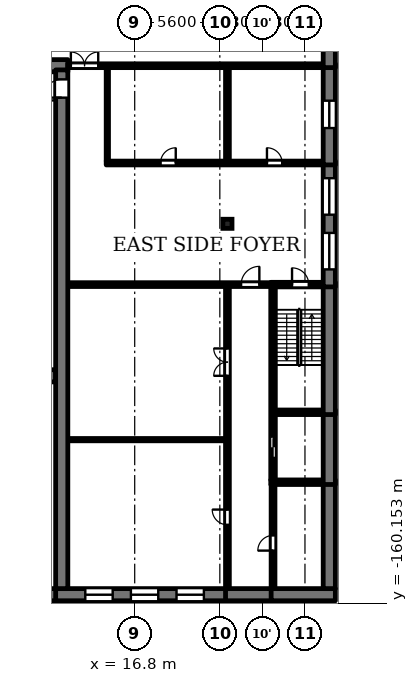
"""IFC4 building model, lengths in metres.
Left out: names, types, materials, properties, quantities, classifications, styles, units other than length and angle.
Written with IfcOpenShell. Run it as: python <this file> out.ifc"""

import sys

from ifc_helpers import new_model, si_unit, direction, frame, frame_2d, origin, origin_2d, place, context, subcontext, project, spatial, rectangle, extrude, element, fill, save


model = new_model("IFC4")
c1 = context("Model", 3, precision=1e-05, world=origin(), true_north=direction((0.0, 1.0)))
c2 = subcontext(c1, "Body", "Model", "MODEL_VIEW")
j1 = project(units=[si_unit("LENGTHUNIT", "METRE"), si_unit("PLANEANGLEUNIT", "RADIAN")], contexts=[c1])
p1 = place(None, origin())
s1 = spatial("IfcSite", under=j1, at=p1, CompositionType="ELEMENT")
p2 = place(p1, origin())
s2 = spatial("IfcBuilding", under=s1, at=p2, CompositionType="ELEMENT")
p3 = place(p2, frame((0.0, 0.0, 6.5)))
s3 = spatial("IfcBuildingStorey", under=s2, at=p3, CompositionType="ELEMENT", Elevation=6.5)
p4 = place(p3, frame((22.9, -135.2, 0.0), z_axis=(0.0, 0.0, 1.0), x_axis=(1.0, 0.0, 0.0)))
e1 = element("IfcColumn", 1, at=p4, inside=s3, PredefinedType="COLUMN", context=c2, shape_type="SweptSolid", body=[
    extrude(rectangle(XDim=0.6, YDim=0.6, at=origin_2d()), origin(), (0.0, 0.0, 1.0), 4.45),
])
p5 = place(p3, frame((-12.4, -159.6, 0.0), z_axis=(0.0, 0.0, 1.0), x_axis=(1.0, 0.0, 0.0)))
e2 = element("IfcWall", 2, at=p5, inside=s3, PredefinedType="SOLIDWALL", context=c2, shape_type="SweptSolid", body=[
    extrude(rectangle(XDim=24.8, YDim=0.8, at=frame_2d((12.4, 0.0))), origin(), (0.0, 0.0, 1.0), 4.8),
])
p6 = place(p3, frame((11.6, -159.6, 0.0), z_axis=(0.0, 0.0, 1.0), x_axis=(1.0, 0.0, 0.0)))
e3 = element("IfcWall", 3, at=p6, inside=s3, PredefinedType="SOLIDWALL", context=c2, shape_type="SweptSolid", body=[
    extrude(rectangle(XDim=11.425, YDim=0.8, at=frame_2d((5.712, 0.0))), origin(), (0.0, 0.0, 1.0), 4.45),
])
p7 = place(p6, frame((1.95, 0.0, 0.9)))
e4 = element("IfcOpeningElement", 4, at=p7, cuts=e3, PredefinedType="OPENING", context=c2, shape_type="SweptSolid", body=[
    extrude(rectangle(XDim=1.8, YDim=1.5, at=frame_2d((0.9, 0.75))), frame((0.0, 0.41, 0.0), z_axis=(0.0, -1.0, 0.0), x_axis=(1.0, 0.0, 0.0)), (0.0, 0.0, 1.0), 0.82),
])
p8 = place(p6, frame((4.95, 0.0, 0.9)))
e5 = element("IfcOpeningElement", 5, at=p8, cuts=e3, PredefinedType="OPENING", context=c2, shape_type="SweptSolid", body=[
    extrude(rectangle(XDim=1.8, YDim=1.5, at=frame_2d((0.9, 0.75))), frame((0.0, 0.41, 0.0), z_axis=(0.0, -1.0, 0.0), x_axis=(1.0, 0.0, 0.0)), (0.0, 0.0, 1.0), 0.82),
])
p9 = place(p6, frame((7.95, 0.0, 0.9)))
e6 = element("IfcOpeningElement", 6, at=p9, cuts=e3, PredefinedType="OPENING", context=c2, shape_type="SweptSolid", body=[
    extrude(rectangle(XDim=1.8, YDim=1.5, at=frame_2d((0.9, 0.75))), frame((0.0, 0.41, 0.0), z_axis=(0.0, -1.0, 0.0), x_axis=(1.0, 0.0, 0.0)), (0.0, 0.0, 1.0), 0.82),
])
p10 = place(p3, frame((22.775, -159.6, 0.0), z_axis=(0.0, 0.0, 1.0), x_axis=(1.0, 0.0, 0.0)))
e7 = element("IfcWall", 7, at=p10, inside=s3, PredefinedType="SOLIDWALL", context=c2, shape_type="SweptSolid", body=[
    extrude(rectangle(XDim=3.25, YDim=0.8, at=frame_2d((1.625, 0.0))), origin(), (0.0, 0.0, 1.0), 4.45),
])
p11 = place(p3, frame((25.775, -159.6, 0.0), z_axis=(0.0, 0.0, 1.0), x_axis=(1.0, 0.0, 0.0)))
e8 = element("IfcWall", 8, at=p11, inside=s3, PredefinedType="SOLIDWALL", context=c2, shape_type="SweptSolid", body=[
    extrude(rectangle(XDim=4.225, YDim=0.8, at=frame_2d((2.112, 0.0))), origin(), (0.0, 0.0, 1.0), 4.45),
])
p12 = place(p3, frame((25.75, -152.2, 0.0), z_axis=(0.0, 0.0, 1.0), x_axis=(1.0, 0.0, 0.0)))
e9 = element("IfcWall", 9, at=p12, inside=s3, PredefinedType="SOLIDWALL", context=c2, shape_type="SweptSolid", body=[
    extrude(rectangle(XDim=3.45, YDim=0.3, at=frame_2d((1.725, 0.0))), origin(), (0.0, 0.0, 1.0), 4.45),
])
p13 = place(p3, frame((12.4, -149.4, 0.0), z_axis=(0.0, 0.0, 1.0), x_axis=(1.0, 0.0, 0.0)))
e10 = element("IfcWall", 10, at=p13, inside=s3, PredefinedType="PARTITIONING", context=c2, shape_type="SweptSolid", body=[
    extrude(rectangle(XDim=10.375, YDim=0.15, at=frame_2d((5.188, 0.0))), origin(), (0.0, 0.0, 1.0), 4.45),
])
p14 = place(p3, frame((26.05, -147.6, 0.0), z_axis=(0.0, 0.0, 1.0), x_axis=(1.0, 0.0, 0.0)))
e11 = element("IfcWall", 11, at=p14, inside=s3, PredefinedType="SOLIDWALL", context=c2, shape_type="SweptSolid", body=[
    extrude(rectangle(XDim=3.15, YDim=0.3, at=frame_2d((1.575, 0.0))), origin(), (0.0, 0.0, 1.0), 4.45),
])
p15 = place(p3, frame((7.0, -145.2, 0.0), z_axis=(0.0, 0.0, 1.0), x_axis=(1.0, 0.0, 0.0)))
e12 = element("IfcWall", 12, at=p15, inside=s3, PredefinedType="SOLIDWALL", context=c2, shape_type="SweptSolid", body=[
    extrude(rectangle(XDim=4.6, YDim=0.8, at=frame_2d((2.3, 0.0))), origin(), (0.0, 0.0, 1.0), 4.8),
])
p16 = place(p3, frame((12.4, -139.2, 0.0), z_axis=(0.0, 0.0, 1.0), x_axis=(1.0, 0.0, 0.0)))
e13 = element("IfcWall", 13, at=p16, inside=s3, PredefinedType="SOLIDWALL", context=c2, shape_type="SweptSolid", body=[
    extrude(rectangle(XDim=13.35, YDim=0.25, at=frame_2d((6.675, 0.0))), origin(), (0.0, 0.0, 1.0), 4.45),
])
p17 = place(p16, frame((11.4, 0.0, 0.0)))
e14 = element("IfcOpeningElement", 14, at=p17, cuts=e13, PredefinedType="OPENING", context=c2, shape_type="SweptSolid", body=[
    extrude(rectangle(XDim=1.2, YDim=2.1, at=frame_2d((0.6, 1.05))), frame((0.0, 0.135, 0.0), z_axis=(0.0, -1.0, 0.0), x_axis=(1.0, 0.0, 0.0)), (0.0, 0.0, 1.0), 0.27),
])
p18 = place(p3, frame((25.75, -139.2, 0.0), z_axis=(0.0, 0.0, 1.0), x_axis=(1.0, 0.0, 0.0)))
e15 = element("IfcWall", 15, at=p18, inside=s3, PredefinedType="SOLIDWALL", context=c2, shape_type="SweptSolid", body=[
    extrude(rectangle(XDim=3.45, YDim=0.3, at=frame_2d((1.725, 0.0))), origin(), (0.0, 0.0, 1.0), 4.45),
])
p19 = place(p18, frame((1.4, 0.0, 0.0)))
e16 = element("IfcOpeningElement", 16, at=p19, cuts=e15, PredefinedType="OPENING", context=c2, shape_type="SweptSolid", body=[
    extrude(rectangle(XDim=1.1, YDim=2.1, at=frame_2d((0.55, 1.05))), frame((0.0, 0.16, 0.0), z_axis=(0.0, -1.0, 0.0), x_axis=(1.0, 0.0, 0.0)), (0.0, 0.0, 1.0), 0.32),
])
p20 = place(p3, frame((14.925, -131.2, 0.0), z_axis=(0.0, 0.0, 1.0), x_axis=(1.0, 0.0, 0.0)))
e17 = element("IfcWall", 17, at=p20, inside=s3, PredefinedType="SOLIDWALL", context=c2, shape_type="SweptSolid", body=[
    extrude(rectangle(XDim=14.275, YDim=0.25, at=frame_2d((7.137, 0.0))), origin(), (0.0, 0.0, 1.0), 4.45),
])
p21 = place(p20, frame((3.575, 0.0, 0.0)))
e18 = element("IfcOpeningElement", 18, at=p21, cuts=e17, PredefinedType="OPENING", context=c2, shape_type="SweptSolid", body=[
    extrude(rectangle(XDim=1.0, YDim=2.1, at=frame_2d((0.5, 1.05))), frame((0.0, 0.135, 0.0), z_axis=(0.0, -1.0, 0.0), x_axis=(1.0, 0.0, 0.0)), (0.0, 0.0, 1.0), 0.27),
])
p22 = place(p20, frame((10.575, 0.0, 0.0)))
e19 = element("IfcOpeningElement", 19, at=p22, cuts=e17, PredefinedType="OPENING", context=c2, shape_type="SweptSolid", body=[
    extrude(rectangle(XDim=1.0, YDim=2.1, at=frame_2d((0.5, 1.05))), frame((0.0, 0.135, 0.0), z_axis=(0.0, -1.0, 0.0), x_axis=(1.0, 0.0, 0.0)), (0.0, 0.0, 1.0), 0.27),
])
p23 = place(p3, frame((-12.4, -124.8, 0.0), z_axis=(0.0, 0.0, 1.0), x_axis=(1.0, 0.0, 0.0)))
e20 = element("IfcWall", 20, at=p23, inside=s3, PredefinedType="SOLIDWALL", context=c2, shape_type="SweptSolid", body=[
    extrude(rectangle(XDim=24.8, YDim=0.8, at=frame_2d((12.4, 0.0))), origin(), (0.0, 0.0, 1.0), 4.8),
])
p24 = place(p23, frame((5.5, 0.0, 0.0)))
e21 = element("IfcOpeningElement", 21, at=p24, cuts=e20, PredefinedType="OPENING", context=c2, shape_type="SweptSolid", body=[
    extrude(rectangle(XDim=1.8, YDim=2.2, at=frame_2d((0.9, 1.1))), frame((0.0, 0.41, 0.0), z_axis=(0.0, -1.0, 0.0), x_axis=(1.0, 0.0, 0.0)), (0.0, 0.0, 1.0), 0.82),
])
p25 = place(p23, frame((17.5, 0.0, 0.0)))
e22 = element("IfcOpeningElement", 22, at=p25, cuts=e20, PredefinedType="OPENING", context=c2, shape_type="SweptSolid", body=[
    extrude(rectangle(XDim=1.8, YDim=2.2, at=frame_2d((0.9, 1.1))), frame((0.0, 0.41, 0.0), z_axis=(0.0, -1.0, 0.0), x_axis=(1.0, 0.0, 0.0)), (0.0, 0.0, 1.0), 0.82),
])
p26 = place(p3, frame((12.4, -124.8, 0.0), z_axis=(0.0, 0.0, 1.0), x_axis=(1.0, 0.0, 0.0)))
e23 = element("IfcWall", 23, at=p26, inside=s3, PredefinedType="SOLIDWALL", context=c2, shape_type="SweptSolid", body=[
    extrude(rectangle(XDim=16.8, YDim=0.25, at=frame_2d((8.4, 0.0))), origin(), (0.0, 0.0, 1.0), 4.45),
])
p27 = place(p26, frame((0.2, 0.0, 0.0)))
e24 = element("IfcOpeningElement", 24, at=p27, cuts=e23, PredefinedType="OPENING", context=c2, shape_type="SweptSolid", body=[
    extrude(rectangle(XDim=1.8, YDim=2.1, at=frame_2d((0.9, 1.05))), frame((0.0, 0.135, 0.0), z_axis=(0.0, -1.0, 0.0), x_axis=(1.0, 0.0, 0.0)), (0.0, 0.0, 1.0), 0.27),
])
p28 = place(p3, frame((12.0, -159.2, 0.0), z_axis=(0.0, 0.0, 1.0), x_axis=(0.0, 1.0, 0.0)))
e25 = element("IfcWall", 25, at=p28, inside=s3, PredefinedType="SOLIDWALL", context=c2, shape_type="SweptSolid", body=[
    extrude(rectangle(XDim=34.125, YDim=0.8, at=frame_2d((17.062, 0.0))), origin(), (0.0, 0.0, 1.0), 4.8),
])
p29 = place(p28, frame((32.3, 0.0, 0.0)))
e26 = element("IfcOpeningElement", 26, at=p29, cuts=e25, PredefinedType="OPENING", context=c2, shape_type="SweptSolid", body=[
    extrude(rectangle(XDim=1.2, YDim=2.1, at=frame_2d((0.6, 1.05))), frame((0.0, 0.41, 0.0), z_axis=(0.0, -1.0, 0.0), x_axis=(1.0, 0.0, 0.0)), (0.0, 0.0, 1.0), 0.82),
])
p30 = place(p3, frame((15.0, -131.075, 0.0), z_axis=(0.0, 0.0, 1.0), x_axis=(0.0, 1.0, 0.0)))
e27 = element("IfcWall", 27, at=p30, inside=s3, PredefinedType="PARTITIONING", context=c2, shape_type="SweptSolid", body=[
    extrude(rectangle(XDim=6.15, YDim=0.15, at=frame_2d((3.075, 0.0))), origin(), (0.0, 0.0, 1.0), 4.45),
])
p31 = place(p3, frame((22.9, -159.2, 0.0), z_axis=(0.0, 0.0, 1.0), x_axis=(0.0, 1.0, 0.0)))
e28 = element("IfcWall", 28, at=p31, inside=s3, PredefinedType="SOLIDWALL", context=c2, shape_type="SweptSolid", body=[
    extrude(rectangle(XDim=19.875, YDim=0.25, at=frame_2d((9.938, 0.0))), origin(), (0.0, 0.0, 1.0), 4.45),
])
p32 = place(p31, frame((14.0, 0.0, 0.0)))
e29 = element("IfcOpeningElement", 29, at=p32, cuts=e28, PredefinedType="OPENING", context=c2, shape_type="SweptSolid", body=[
    extrude(rectangle(XDim=1.8, YDim=2.1, at=frame_2d((0.9, 1.05))), frame((0.0, 0.135, 0.0), z_axis=(0.0, -1.0, 0.0), x_axis=(1.0, 0.0, 0.0)), (0.0, 0.0, 1.0), 0.27),
])
p33 = place(p31, frame((4.2, 0.0, 0.0)))
e30 = element("IfcOpeningElement", 30, at=p33, cuts=e28, PredefinedType="OPENING", context=c2, shape_type="SweptSolid", body=[
    extrude(rectangle(XDim=1.0, YDim=2.1, at=frame_2d((0.5, 1.05))), frame((0.0, 0.135, 0.0), z_axis=(0.0, -1.0, 0.0), x_axis=(1.0, 0.0, 0.0)), (0.0, 0.0, 1.0), 0.27),
])
p34 = place(p3, frame((22.9, -131.075, 0.0), z_axis=(0.0, 0.0, 1.0), x_axis=(0.0, 1.0, 0.0)))
e31 = element("IfcWall", 31, at=p34, inside=s3, PredefinedType="SOLIDWALL", context=c2, shape_type="SweptSolid", body=[
    extrude(rectangle(XDim=6.15, YDim=0.25, at=frame_2d((3.075, 0.0))), origin(), (0.0, 0.0, 1.0), 4.45),
])
p35 = place(p3, frame((25.9, -159.2, 0.0), z_axis=(0.0, 0.0, 1.0), x_axis=(0.0, 1.0, 0.0)))
e32 = element("IfcWall", 32, at=p35, inside=s3, PredefinedType="SOLIDWALL", context=c2, shape_type="SweptSolid", body=[
    extrude(rectangle(XDim=6.85, YDim=0.25, at=frame_2d((3.425, 0.0))), origin(), (0.0, 0.0, 1.0), 4.45),
])
p36 = place(p35, frame((2.5, 0.0, 0.0)))
e33 = element("IfcOpeningElement", 33, at=p36, cuts=e32, PredefinedType="OPENING", context=c2, shape_type="SweptSolid", body=[
    extrude(rectangle(XDim=1.0, YDim=2.1, at=frame_2d((0.5, 1.05))), frame((0.0, 0.135, 0.0), z_axis=(0.0, -1.0, 0.0), x_axis=(1.0, 0.0, 0.0)), (0.0, 0.0, 1.0), 0.27),
])
p37 = place(p3, frame((25.9, -152.05, 0.0), z_axis=(0.0, 0.0, 1.0), x_axis=(0.0, 1.0, 0.0)))
e34 = element("IfcWall", 34, at=p37, inside=s3, PredefinedType="SOLIDWALL", context=c2, shape_type="SweptSolid", body=[
    extrude(rectangle(XDim=12.825, YDim=0.3, at=frame_2d((6.413, 0.0))), origin(), (0.0, 0.0, 1.0), 4.45),
])
p38 = place(p37, frame((1.45, 0.0, 0.0)))
e35 = element("IfcOpeningElement", 35, at=p38, cuts=e34, PredefinedType="OPENING", context=c2, shape_type="SweptSolid", body=[
    extrude(rectangle(XDim=1.4, YDim=2.2, at=frame_2d((0.7, 1.1))), frame((0.0, 0.16, 0.0), z_axis=(0.0, -1.0, 0.0), x_axis=(1.0, 0.0, 0.0)), (0.0, 0.0, 1.0), 0.32),
])
p39 = place(p3, frame((29.6, -152.05, 0.0), z_axis=(0.0, 0.0, 1.0), x_axis=(0.0, -1.0, 0.0)))
e36 = element("IfcWall", 36, at=p39, inside=s3, PredefinedType="SOLIDWALL", context=c2, shape_type="SweptSolid", body=[
    extrude(rectangle(XDim=7.15, YDim=0.8, at=frame_2d((3.575, 0.0))), origin(), (0.0, 0.0, 1.0), 4.45),
])
p40 = place(p3, frame((29.6, -147.45, 0.0), z_axis=(0.0, 0.0, 1.0), x_axis=(0.0, -1.0, 0.0)))
e37 = element("IfcWall", 37, at=p40, inside=s3, PredefinedType="SOLIDWALL", context=c2, shape_type="SweptSolid", body=[
    extrude(rectangle(XDim=4.9, YDim=0.8, at=frame_2d((2.45, 0.0))), origin(), (0.0, 0.0, 1.0), 4.45),
])
p41 = place(p3, frame((29.6, -139.05, 0.0), z_axis=(0.0, 0.0, 1.0), x_axis=(0.0, -1.0, 0.0)))
e38 = element("IfcWall", 38, at=p41, inside=s3, PredefinedType="SOLIDWALL", context=c2, shape_type="SweptSolid", body=[
    extrude(rectangle(XDim=8.7, YDim=0.8, at=frame_2d((4.35, 0.0))), origin(), (0.0, 0.0, 1.0), 4.45),
])
p42 = place(p3, frame((29.6, -131.075, 0.0), z_axis=(0.0, 0.0, 1.0), x_axis=(0.0, -1.0, 0.0)))
e39 = element("IfcWall", 39, at=p42, inside=s3, PredefinedType="SOLIDWALL", context=c2, shape_type="SweptSolid", body=[
    extrude(rectangle(XDim=8.275, YDim=0.8, at=frame_2d((4.137, 0.0))), origin(), (0.0, 0.0, 1.0), 4.45),
])
p43 = place(p42, frame((4.725, 0.0, 0.6)))
e40 = element("IfcOpeningElement", 40, at=p43, cuts=e39, PredefinedType="OPENING", context=c2, shape_type="SweptSolid", body=[
    extrude(rectangle(XDim=2.4, YDim=3.2, at=frame_2d((1.2, 1.6))), frame((0.0, 0.41, 0.0), z_axis=(0.0, -1.0, 0.0), x_axis=(1.0, 0.0, 0.0)), (0.0, 0.0, 1.0), 0.82),
])
p44 = place(p42, frame((1.125, 0.0, 0.6)))
e41 = element("IfcOpeningElement", 41, at=p44, cuts=e39, PredefinedType="OPENING", context=c2, shape_type="SweptSolid", body=[
    extrude(rectangle(XDim=2.4, YDim=3.2, at=frame_2d((1.2, 1.6))), frame((0.0, 0.41, 0.0), z_axis=(0.0, -1.0, 0.0), x_axis=(1.0, 0.0, 0.0)), (0.0, 0.0, 1.0), 0.82),
])
p45 = place(p3, frame((29.6, -124.675, 0.0), z_axis=(0.0, 0.0, 1.0), x_axis=(0.0, -1.0, 0.0)))
e42 = element("IfcWall", 42, at=p45, inside=s3, PredefinedType="SOLIDWALL", context=c2, shape_type="SweptSolid", body=[
    extrude(rectangle(XDim=6.65, YDim=0.8, at=frame_2d((3.325, 0.0))), origin(), (0.0, 0.0, 1.0), 4.45),
])
p46 = place(p45, frame((2.425, 0.0, 0.9)))
e43 = element("IfcOpeningElement", 43, at=p46, cuts=e42, PredefinedType="OPENING", context=c2, shape_type="SweptSolid", body=[
    extrude(rectangle(XDim=1.8, YDim=1.5, at=frame_2d((0.9, 0.75))), frame((0.0, 0.41, 0.0), z_axis=(0.0, -1.0, 0.0), x_axis=(1.0, 0.0, 0.0)), (0.0, 0.0, 1.0), 0.82),
])
p47 = place(p3, frame((29.6, -121.05, 0.0), z_axis=(0.0, 0.0, 1.0), x_axis=(0.0, -1.0, 0.0)))
e44 = element("IfcWall", 44, at=p47, inside=s3, PredefinedType="SOLIDWALL", context=c2, shape_type="SweptSolid", body=[
    extrude(rectangle(XDim=3.875, YDim=0.8, at=frame_2d((1.938, 0.0))), origin(), (0.0, 0.0, 1.0), 4.45),
])
p48 = place(p43, origin())
e45 = element("IfcWindow", 45, at=p48, inside=s3, PartitioningType="SINGLE_PANEL", PredefinedType="WINDOW", context=c2, shape_type="SweptSolid", body=[
    extrude(rectangle(XDim=2.4, YDim=3.2, at=frame_2d((1.2, 1.6))), frame((0.0, 0.03, 0.0), z_axis=(0.0, -1.0, 0.0), x_axis=(1.0, 0.0, 0.0)), (0.0, 0.0, 1.0), 0.06),
])
fill(e40, e45)
p49 = place(p44, origin())
e46 = element("IfcWindow", 46, at=p49, inside=s3, PartitioningType="SINGLE_PANEL", PredefinedType="WINDOW", context=c2, shape_type="SweptSolid", body=[
    extrude(rectangle(XDim=2.4, YDim=3.2, at=frame_2d((1.2, 1.6))), frame((0.0, 0.03, 0.0), z_axis=(0.0, -1.0, 0.0), x_axis=(1.0, 0.0, 0.0)), (0.0, 0.0, 1.0), 0.06),
])
fill(e41, e46)
p50 = place(p46, origin())
e47 = element("IfcWindow", 47, at=p50, inside=s3, PartitioningType="SINGLE_PANEL", PredefinedType="WINDOW", context=c2, shape_type="SweptSolid", body=[
    extrude(rectangle(XDim=1.8, YDim=1.5, at=frame_2d((0.9, 0.75))), frame((0.0, 0.03, 0.0), z_axis=(0.0, -1.0, 0.0), x_axis=(1.0, 0.0, 0.0)), (0.0, 0.0, 1.0), 0.06),
])
fill(e43, e47)
p51 = place(p7, origin())
e48 = element("IfcWindow", 48, at=p51, inside=s3, PartitioningType="SINGLE_PANEL", PredefinedType="WINDOW", context=c2, shape_type="SweptSolid", body=[
    extrude(rectangle(XDim=1.8, YDim=1.5, at=frame_2d((0.9, 0.75))), frame((0.0, 0.03, 0.0), z_axis=(0.0, -1.0, 0.0), x_axis=(1.0, 0.0, 0.0)), (0.0, 0.0, 1.0), 0.06),
])
fill(e4, e48)
p52 = place(p8, origin())
e49 = element("IfcWindow", 49, at=p52, inside=s3, PartitioningType="SINGLE_PANEL", PredefinedType="WINDOW", context=c2, shape_type="SweptSolid", body=[
    extrude(rectangle(XDim=1.8, YDim=1.5, at=frame_2d((0.9, 0.75))), frame((0.0, 0.03, 0.0), z_axis=(0.0, -1.0, 0.0), x_axis=(1.0, 0.0, 0.0)), (0.0, 0.0, 1.0), 0.06),
])
fill(e5, e49)
p53 = place(p9, origin())
e50 = element("IfcWindow", 50, at=p53, inside=s3, PartitioningType="SINGLE_PANEL", PredefinedType="WINDOW", context=c2, shape_type="SweptSolid", body=[
    extrude(rectangle(XDim=1.8, YDim=1.5, at=frame_2d((0.9, 0.75))), frame((0.0, 0.03, 0.0), z_axis=(0.0, -1.0, 0.0), x_axis=(1.0, 0.0, 0.0)), (0.0, 0.0, 1.0), 0.06),
])
fill(e6, e50)
p54 = place(p38, origin())
e51 = element("IfcDoor", 51, at=p54, inside=s3, OperationType="DOUBLE_DOOR_SLIDING", PredefinedType="DOOR", context=c2, shape_type="SweptSolid", body=[
    extrude(rectangle(XDim=1.4, YDim=2.2, at=frame_2d((0.7, 1.1))), frame((0.0, 0.025, 0.0), z_axis=(0.0, -1.0, 0.0), x_axis=(1.0, 0.0, 0.0)), (0.0, 0.0, 1.0), 0.05),
])
fill(e35, e51)
p55 = place(p19, origin())
e52 = element("IfcDoor", 52, at=p55, inside=s3, OperationType="SINGLE_SWING_LEFT", PredefinedType="DOOR", context=c2, shape_type="SweptSolid", body=[
    extrude(rectangle(XDim=1.1, YDim=2.1, at=frame_2d((0.55, 1.05))), frame((0.0, 0.025, 0.0), z_axis=(0.0, -1.0, 0.0), x_axis=(1.0, 0.0, 0.0)), (0.0, 0.0, 1.0), 0.05),
])
fill(e16, e52)
p56 = place(p29, origin())
e53 = element("IfcDoor", 53, at=p56, inside=s3, OperationType="SINGLE_SWING_LEFT", PredefinedType="DOOR", context=c2, shape_type="SweptSolid", body=[
    extrude(rectangle(XDim=1.2, YDim=2.1, at=frame_2d((0.6, 1.05))), frame((0.0, 0.025, 0.0), z_axis=(0.0, -1.0, 0.0), x_axis=(1.0, 0.0, 0.0)), (0.0, 0.0, 1.0), 0.05),
])
fill(e26, e53)
p57 = place(p27, origin())
e54 = element("IfcDoor", 54, at=p57, inside=s3, OperationType="DOUBLE_DOOR_SINGLE_SWING", PredefinedType="DOOR", context=c2, shape_type="SweptSolid", body=[
    extrude(rectangle(XDim=1.8, YDim=2.1, at=frame_2d((0.9, 1.05))), frame((0.0, 0.025, 0.0), z_axis=(0.0, -1.0, 0.0), x_axis=(1.0, 0.0, 0.0)), (0.0, 0.0, 1.0), 0.05),
])
fill(e24, e54)
p58 = place(p17, origin())
e55 = element("IfcDoor", 55, at=p58, inside=s3, OperationType="SINGLE_SWING_RIGHT", PredefinedType="DOOR", context=c2, shape_type="SweptSolid", body=[
    extrude(rectangle(XDim=1.2, YDim=2.1, at=frame_2d((0.6, 1.05))), frame((0.0, 0.025, 0.0), z_axis=(0.0, -1.0, 0.0), x_axis=(1.0, 0.0, 0.0)), (0.0, 0.0, 1.0), 0.05),
])
fill(e14, e55)
p59 = place(p32, origin())
e56 = element("IfcDoor", 56, at=p59, inside=s3, OperationType="DOUBLE_DOOR_SINGLE_SWING", PredefinedType="DOOR", context=c2, shape_type="SweptSolid", body=[
    extrude(rectangle(XDim=1.8, YDim=2.1, at=frame_2d((0.9, 1.05))), frame((0.0, 0.025, 0.0), z_axis=(0.0, -1.0, 0.0), x_axis=(1.0, 0.0, 0.0)), (0.0, 0.0, 1.0), 0.05),
])
fill(e29, e56)
p60 = place(p33, origin())
e57 = element("IfcDoor", 57, at=p60, inside=s3, OperationType="SINGLE_SWING_RIGHT", PredefinedType="DOOR", context=c2, shape_type="SweptSolid", body=[
    extrude(rectangle(XDim=1.0, YDim=2.1, at=frame_2d((0.5, 1.05))), frame((0.0, 0.025, 0.0), z_axis=(0.0, -1.0, 0.0), x_axis=(1.0, 0.0, 0.0)), (0.0, 0.0, 1.0), 0.05),
])
fill(e30, e57)
p61 = place(p36, origin())
e58 = element("IfcDoor", 58, at=p61, inside=s3, OperationType="SINGLE_SWING_LEFT", PredefinedType="DOOR", context=c2, shape_type="SweptSolid", body=[
    extrude(rectangle(XDim=1.0, YDim=2.1, at=frame_2d((0.5, 1.05))), frame((0.0, 0.025, 0.0), z_axis=(0.0, -1.0, 0.0), x_axis=(1.0, 0.0, 0.0)), (0.0, 0.0, 1.0), 0.05),
])
fill(e33, e58)
p62 = place(p21, origin())
e59 = element("IfcDoor", 59, at=p62, inside=s3, OperationType="SINGLE_SWING_RIGHT", PredefinedType="DOOR", context=c2, shape_type="SweptSolid", body=[
    extrude(rectangle(XDim=1.0, YDim=2.1, at=frame_2d((0.5, 1.05))), frame((0.0, 0.025, 0.0), z_axis=(0.0, -1.0, 0.0), x_axis=(1.0, 0.0, 0.0)), (0.0, 0.0, 1.0), 0.05),
])
fill(e18, e59)
p63 = place(p22, origin())
e60 = element("IfcDoor", 60, at=p63, inside=s3, OperationType="SINGLE_SWING_LEFT", PredefinedType="DOOR", context=c2, shape_type="SweptSolid", body=[
    extrude(rectangle(XDim=1.0, YDim=2.1, at=frame_2d((0.5, 1.05))), frame((0.0, 0.025, 0.0), z_axis=(0.0, -1.0, 0.0), x_axis=(1.0, 0.0, 0.0)), (0.0, 0.0, 1.0), 0.05),
])
fill(e19, e60)
save(model, sys.argv[1])
